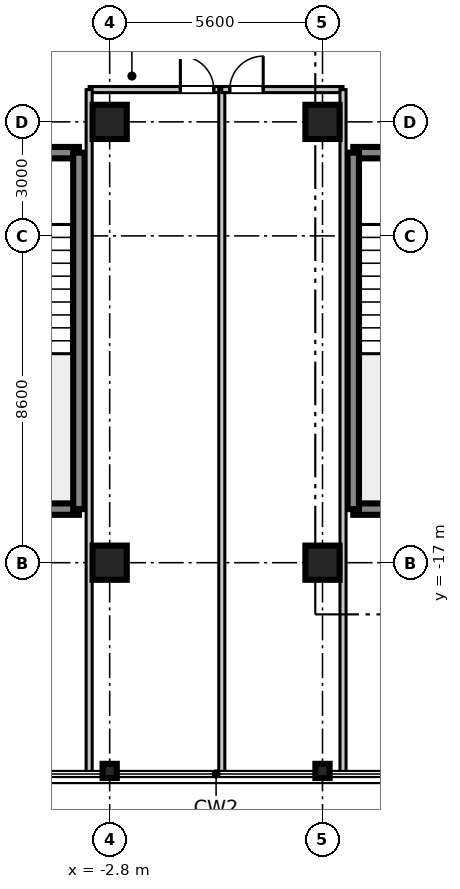
"""IFC4 building model, lengths in metres.
Left out: names, types, materials, properties, quantities, classifications, styles, units other than length and angle.
Written with IfcOpenShell. Run it as: python <this file> out.ifc"""

import sys

from ifc_helpers import new_model, si_unit, direction, frame, frame_2d, origin, origin_2d, place, context, subcontext, project, spatial, rectangle, i_section, extrude, source, transform, mapped, element, fill, save


model = new_model("IFC4")
c1 = context("Model", 3, precision=1e-05, world=origin(), true_north=direction((0.0, 1.0)))
c2 = subcontext(c1, "Body", "Model", "MODEL_VIEW")
j1 = project(units=[si_unit("LENGTHUNIT", "METRE"), si_unit("PLANEANGLEUNIT", "RADIAN")], contexts=[c1])
p1 = place(None, origin())
s1 = spatial("IfcSite", under=j1, at=p1, CompositionType="ELEMENT")
p2 = place(p1, origin())
s2 = spatial("IfcBuilding", under=s1, at=p2, CompositionType="ELEMENT")
p3 = place(p2, frame((0.0, 0.0, 327.15)))
s3 = spatial("IfcBuildingStorey", under=s2, at=p3, CompositionType="ELEMENT", Elevation=327.15)
m1 = source(origin(), c2, "Body", "SweptSolid", [
    extrude(rectangle(XDim=0.9, YDim=0.9, at=origin_2d()), origin(), (0.0, 0.0, 1.0), 3.755),
])
for number, where, z_axis, x_axis in (
    (1, (-2.8, -17.0, 0.0), (0.0, 0.0, 1.0), (1.0, 0.0, 0.0)),
    (2, (-2.8, -5.4, 0.0), (0.0, 0.0, 1.0), (1.0, 0.0, 0.0)),
    (3, (2.8, -17.0, 0.0), (0.0, 0.0, 1.0), (1.0, 0.0, 0.0)),
    (4, (2.8, -5.4, 0.0), (0.0, 0.0, 1.0), (1.0, 0.0, 0.0)),
):
    element("IfcColumn", number, at=place(p3, frame(where, z_axis=z_axis, x_axis=x_axis)), inside=s3, PredefinedType="COLUMN", context=c2, shape_type="MappedRepresentation", body=[
        mapped(m1, transform((0.0, 0.0, 0.0), scale=1.0)),
    ])
m2 = source(origin(), c2, "Body", "SweptSolid", [
    extrude(i_section(OverallWidth=0.374, OverallDepth=0.374, WebThickness=0.014, FlangeThickness=0.023, at=origin_2d()), origin(), (0.0, 0.0, 1.0), 3.755),
])
for number, where, z_axis, x_axis in (
    (5, (-2.8, -22.48, 0.0), (0.0, 0.0, 1.0), (0.0, 1.0, 0.0)),
    (6, (2.8, -22.48, 0.0), (0.0, 0.0, 1.0), (0.0, 1.0, 0.0)),
):
    element("IfcColumn", number, at=place(p3, frame(where, z_axis=z_axis, x_axis=x_axis)), inside=s3, PredefinedType="COLUMN", context=c2, shape_type="MappedRepresentation", body=[
        mapped(m2, transform((0.0, 0.0, 0.0), scale=1.0)),
    ])
m3 = source(origin(), c2, "Body", "SweptSolid", [
    extrude(rectangle(XDim=3.98, YDim=0.3, at=frame_2d((1.99, 0.0))), origin(), (0.0, 0.0, 1.0), 3.5),
])
for number, where, z_axis, x_axis in (
    (7, (3.61, -15.59, 0.0), (0.0, 0.0, 1.0), (1.0, 0.0, 0.0)),
    (8, (3.61, -6.21, 0.0), (0.0, 0.0, 1.0), (1.0, 0.0, 0.0)),
):
    element("IfcWall", number, at=place(p3, frame(where, z_axis=z_axis, x_axis=x_axis)), inside=s3, PredefinedType="SHEAR", context=c2, shape_type="MappedRepresentation", body=[
        mapped(m3, transform((0.0, 0.0, 0.0), scale=1.0)),
    ])
m4 = source(origin(), c2, "Body", "SweptSolid", [
    extrude(rectangle(XDim=9.38, YDim=0.3, at=frame_2d((4.69, 0.0))), origin(), (0.0, 0.0, 1.0), 3.5),
])
p4 = place(p3, frame((3.61, -15.59, 0.0), z_axis=(0.0, 0.0, 1.0), x_axis=(0.0, 1.0, 0.0)))
e9 = element("IfcWall", 9, at=p4, inside=s3, PredefinedType="SHEAR", context=c2, shape_type="MappedRepresentation", body=[
    mapped(m4, transform((0.0, 0.0, 0.0), scale=1.0)),
])
p5 = place(p3, frame((-7.59, -15.59, 0.0), z_axis=(0.0, 0.0, 1.0), x_axis=(1.0, 0.0, 0.0)))
e10 = element("IfcWall", 10, at=p5, inside=s3, PredefinedType="SHEAR", context=c2, shape_type="MappedRepresentation", body=[
    mapped(m3, transform((0.0, 0.0, 0.0), scale=1.0)),
])
p6 = place(p3, frame((-7.59, -6.21, 0.0), z_axis=(0.0, 0.0, 1.0), x_axis=(1.0, 0.0, 0.0)))
e11 = element("IfcWall", 11, at=p6, inside=s3, PredefinedType="SHEAR", context=c2, shape_type="MappedRepresentation", body=[
    mapped(m3, transform((0.0, 0.0, 0.0), scale=1.0)),
])
p7 = place(p6, frame((1.44, 0.0, 0.0)))
e12 = element("IfcOpeningElement", 12, at=p7, cuts=e11, PredefinedType="OPENING", context=c2, shape_type="SweptSolid", body=[
    extrude(rectangle(XDim=1.1, YDim=2.15, at=frame_2d((0.55, 1.075))), frame((0.0, 0.16, 0.0), z_axis=(0.0, -1.0, 0.0), x_axis=(1.0, 0.0, 0.0)), (0.0, 0.0, 1.0), 0.32),
])
p8 = place(p3, frame((-3.61, -15.59, 0.0), z_axis=(0.0, 0.0, 1.0), x_axis=(0.0, 1.0, 0.0)))
e13 = element("IfcWall", 13, at=p8, inside=s3, PredefinedType="SHEAR", context=c2, shape_type="MappedRepresentation", body=[
    mapped(m4, transform((0.0, 0.0, 0.0), scale=1.0)),
])
m5 = source(origin(), c2, "Body", "SweptSolid", [
    extrude(rectangle(XDim=3.49, YDim=0.16, at=frame_2d((1.745, 0.0))), origin(), (0.0, 0.0, 1.0), 2.84),
])
p9 = place(p3, frame((-3.34, -4.55, 0.0), z_axis=(0.0, 0.0, 1.0), x_axis=(1.0, 0.0, 0.0)))
e14 = element("IfcWall", 14, at=p9, inside=s3, PredefinedType="PARTITIONING", context=c2, shape_type="MappedRepresentation", body=[
    mapped(m5, transform((0.0, 0.0, 0.0), scale=1.0)),
])
p10 = place(p9, frame((2.4, 0.0, 0.0)))
e15 = element("IfcOpeningElement", 15, at=p10, cuts=e14, PredefinedType="OPENING", context=c2, shape_type="SweptSolid", body=[
    extrude(rectangle(XDim=0.88, YDim=2.1, at=frame_2d((0.44, 1.05))), frame((0.0, 0.09, 0.0), z_axis=(0.0, -1.0, 0.0), x_axis=(1.0, 0.0, 0.0)), (0.0, 0.0, 1.0), 0.18),
])
m6 = source(origin(), c2, "Body", "SweptSolid", [
    extrude(rectangle(XDim=17.95, YDim=0.16, at=frame_2d((8.975, 0.0))), origin(), (0.0, 0.0, 1.0), 2.84),
])
for number, where, z_axis, x_axis in (
    (16, (-3.34, -22.5, 0.0), (0.0, 0.0, 1.0), (0.0, 1.0, 0.0)),
    (17, (0.15, -22.5, 0.0), (0.0, 0.0, 1.0), (0.0, 1.0, 0.0)),
):
    element("IfcWall", number, at=place(p3, frame(where, z_axis=z_axis, x_axis=x_axis)), inside=s3, PredefinedType="PARTITIONING", context=c2, shape_type="MappedRepresentation", body=[
        mapped(m6, transform((0.0, 0.0, 0.0), scale=1.0)),
    ])
m7 = source(origin(), c2, "Body", "SweptSolid", [
    extrude(rectangle(XDim=3.19, YDim=0.16, at=frame_2d((1.595, 0.0))), origin(), (0.0, 0.0, 1.0), 2.84),
])
p11 = place(p3, frame((0.15, -4.55, 0.0), z_axis=(0.0, 0.0, 1.0), x_axis=(1.0, 0.0, 0.0)))
e18 = element("IfcWall", 18, at=p11, inside=s3, PredefinedType="PARTITIONING", context=c2, shape_type="MappedRepresentation", body=[
    mapped(m7, transform((0.0, 0.0, 0.0), scale=1.0)),
])
p12 = place(p11, frame((0.21, 0.0, 0.0)))
e19 = element("IfcOpeningElement", 19, at=p12, cuts=e18, PredefinedType="OPENING", context=c2, shape_type="SweptSolid", body=[
    extrude(rectangle(XDim=0.88, YDim=2.1, at=frame_2d((0.44, 1.05))), frame((0.0, 0.09, 0.0), z_axis=(0.0, -1.0, 0.0), x_axis=(1.0, 0.0, 0.0)), (0.0, 0.0, 1.0), 0.18),
])
p13 = place(p3, frame((3.34, -22.5, 0.0), z_axis=(0.0, 0.0, 1.0), x_axis=(0.0, 1.0, 0.0)))
e20 = element("IfcWall", 20, at=p13, inside=s3, PredefinedType="PARTITIONING", context=c2, shape_type="MappedRepresentation", body=[
    mapped(m6, transform((0.0, 0.0, 0.0), scale=1.0)),
])
m8 = source(origin(), c2, "Body", "SweptSolid", [
    extrude(rectangle(XDim=0.88, YDim=2.1, at=frame_2d((0.44, 1.05))), frame((0.0, 0.025, 0.0), z_axis=(0.0, -1.0, 0.0), x_axis=(1.0, 0.0, 0.0)), (0.0, 0.0, 1.0), 0.05),
])
p14 = place(p10, frame((0.88, 0.0, 0.0), z_axis=(0.0, 0.0, 1.0), x_axis=(-1.0, 0.0, 0.0)))
e21 = element("IfcDoor", 21, at=p14, inside=s3, OperationType="SINGLE_SWING_LEFT", PredefinedType="DOOR", context=c2, shape_type="MappedRepresentation", body=[
    mapped(m8, transform((0.0, 0.0, 0.0), scale=1.0)),
])
fill(e15, e21)
p15 = place(p12, frame((0.88, 0.0, 0.0), z_axis=(0.0, 0.0, 1.0), x_axis=(-1.0, 0.0, 0.0)))
e22 = element("IfcDoor", 22, at=p15, inside=s3, OperationType="SINGLE_SWING_RIGHT", PredefinedType="DOOR", context=c2, shape_type="MappedRepresentation", body=[
    mapped(m8, transform((0.0, 0.0, 0.0), scale=1.0)),
])
fill(e19, e22)
save(model, sys.argv[1])
